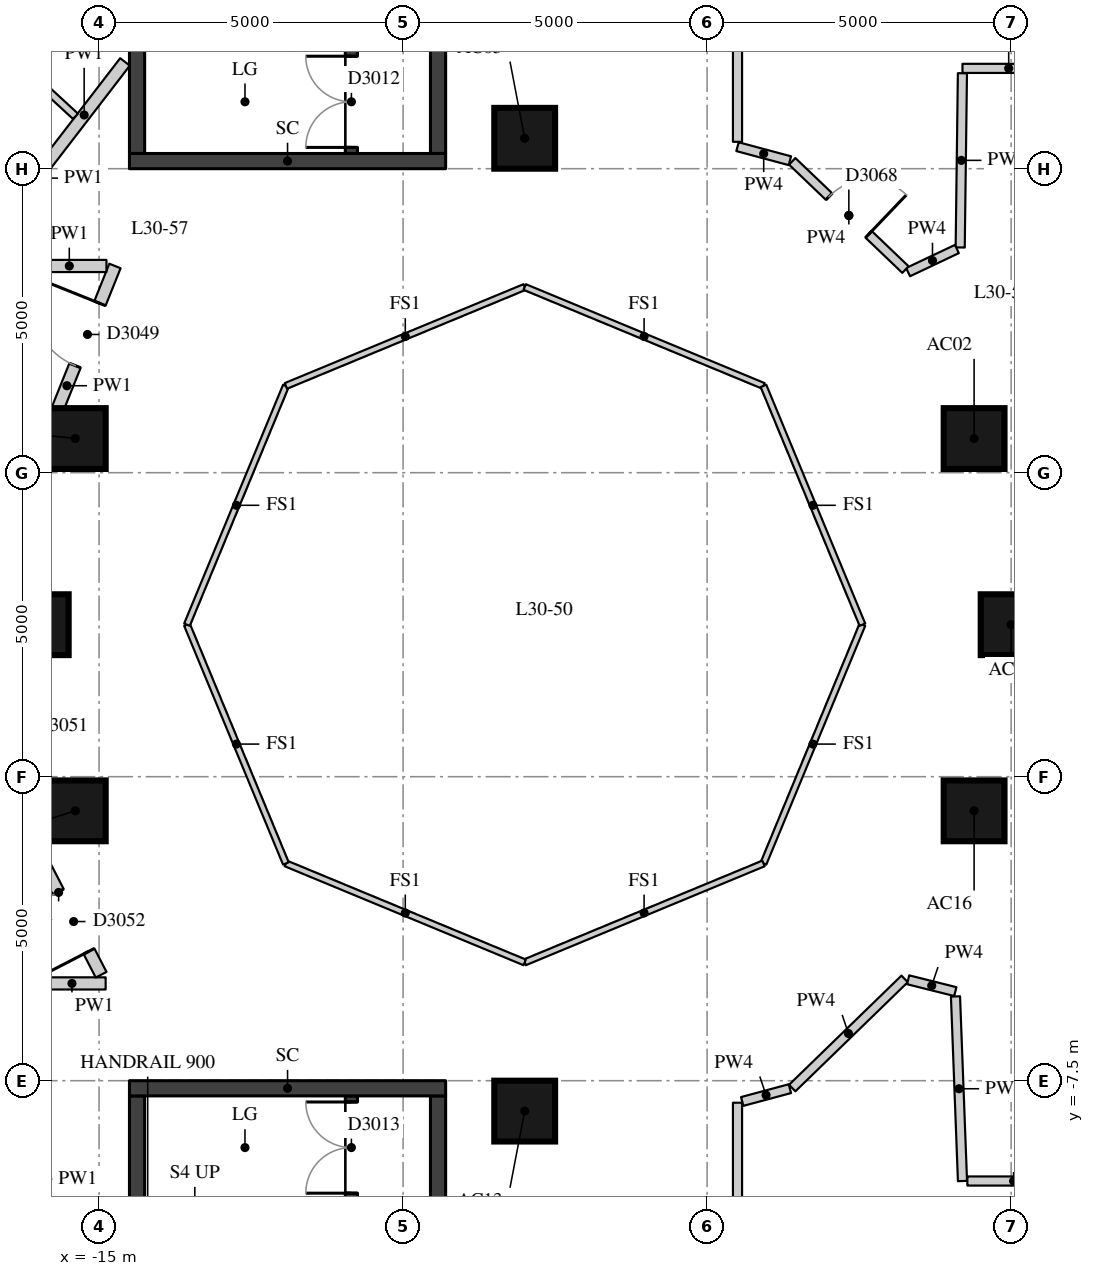
"""IFC4 building model, lengths in metres.
Left out: names, types, materials, properties, quantities, classifications, styles, units other than length and angle.
Written with IfcOpenShell. Run it as: python <this file> out.ifc"""

import sys

from ifc_helpers import new_model, si_unit, direction, frame, frame_2d, origin, origin_2d, place, context, subcontext, project, spatial, rectangle, extrude, element, fill, save


model = new_model("IFC4")
c1 = context("Model", 3, precision=1e-05, world=origin(), true_north=direction((0.0, 1.0)))
c2 = subcontext(c1, "Body", "Model", "MODEL_VIEW")
j1 = project(units=[si_unit("LENGTHUNIT", "METRE"), si_unit("PLANEANGLEUNIT", "RADIAN")], contexts=[c1])
p1 = place(None, origin())
s1 = spatial("IfcSite", under=j1, at=p1, CompositionType="ELEMENT")
p2 = place(p1, origin())
s2 = spatial("IfcBuilding", under=s1, at=p2, CompositionType="ELEMENT")
p3 = place(p2, frame((0.0, 0.0, 108.7)))
s3 = spatial("IfcBuildingStorey", under=s2, at=p3, CompositionType="ELEMENT", Elevation=108.7)
for number, where, z_axis, x_axis in (
    (1, (0.0, 0.0, 0.0), (0.0, 0.0, 1.0), (1.0, 0.0, 0.0)),
    (2, (-0.609, 3.062, 0.0), (0.0, 0.0, 1.0), (1.0, 0.0, 0.0)),
    (3, (-8.0, 8.0, 0.0), (0.0, 0.0, 1.0), (1.0, 0.0, 0.0)),
    (4, (-15.391, 3.062, 0.0), (0.0, 0.0, 1.0), (1.0, 0.0, 0.0)),
    (5, (-16.0, 0.0, 0.0), (0.0, 0.0, 1.0), (1.0, 0.0, 0.0)),
    (6, (-15.391, -3.062, 0.0), (0.0, 0.0, 1.0), (1.0, 0.0, 0.0)),
    (7, (-8.0, -8.0, 0.0), (0.0, 0.0, 1.0), (1.0, 0.0, 0.0)),
    (8, (-0.609, -3.062, 0.0), (0.0, 0.0, 1.0), (1.0, 0.0, 0.0)),
):
    element("IfcColumn", number, at=place(p3, frame(where, z_axis=z_axis, x_axis=x_axis)), inside=s3, PredefinedType="COLUMN", context=c2, shape_type="SweptSolid", body=[
        extrude(rectangle(XDim=1.0, YDim=1.0, at=origin_2d()), origin(), (0.0, 0.0, 1.0), 3.3),
    ])
p4 = place(p3, frame((-10.85, 7.75, 0.0), z_axis=(0.0, 0.0, 1.0), x_axis=(0.0, 1.0, 0.0)))
e9 = element("IfcWall", 9, at=p4, inside=s3, PredefinedType="SHEAR", context=c2, shape_type="SweptSolid", body=[
    extrude(rectangle(XDim=6.0, YDim=0.2, at=frame_2d((3.0, 0.0))), origin(), (0.0, 0.0, 1.0), 3.02),
])
p5 = place(p4, frame((0.1, 0.0, 0.0)))
e10 = element("IfcOpeningElement", 10, at=p5, cuts=e9, PredefinedType="OPENING", context=c2, shape_type="SweptSolid", body=[
    extrude(rectangle(XDim=1.5, YDim=2.1, at=frame_2d((0.75, 1.05))), frame((0.0, 0.11, 0.0), z_axis=(0.0, -1.0, 0.0), x_axis=(1.0, 0.0, 0.0)), (0.0, 0.0, 1.0), 0.22),
])
p6 = place(p3, frame((-10.85, -13.75, 0.0), z_axis=(0.0, 0.0, 1.0), x_axis=(0.0, 1.0, 0.0)))
e11 = element("IfcWall", 11, at=p6, inside=s3, PredefinedType="SHEAR", context=c2, shape_type="SweptSolid", body=[
    extrude(rectangle(XDim=6.0, YDim=0.2, at=frame_2d((3.0, 0.0))), origin(), (0.0, 0.0, 1.0), 3.02),
])
p7 = place(p6, frame((4.4, 0.0, 0.0)))
e12 = element("IfcOpeningElement", 12, at=p7, cuts=e11, PredefinedType="OPENING", context=c2, shape_type="SweptSolid", body=[
    extrude(rectangle(XDim=1.5, YDim=2.1, at=frame_2d((0.75, 1.05))), frame((0.0, 0.11, 0.0), z_axis=(0.0, -1.0, 0.0), x_axis=(1.0, 0.0, 0.0)), (0.0, 0.0, 1.0), 0.22),
])
p8 = place(p3, frame((-14.375, 7.75, -0.28), z_axis=(0.0, 0.0, 1.0), x_axis=(0.0, 1.0, 0.0)))
e13 = element("IfcWall", 13, at=p8, inside=s3, PredefinedType="SHEAR", context=c2, shape_type="SweptSolid", body=[
    extrude(rectangle(XDim=6.0, YDim=0.25, at=frame_2d((3.0, 0.0))), origin(), (0.0, 0.0, 1.0), 3.3),
])
p9 = place(p3, frame((-9.425, 7.75, -0.28), z_axis=(0.0, 0.0, 1.0), x_axis=(0.0, 1.0, 0.0)))
e14 = element("IfcWall", 14, at=p9, inside=s3, PredefinedType="SHEAR", context=c2, shape_type="SweptSolid", body=[
    extrude(rectangle(XDim=6.0, YDim=0.25, at=frame_2d((3.0, 0.0))), origin(), (0.0, 0.0, 1.0), 3.3),
])
p10 = place(p9, frame((2.1, 0.0, 0.28)))
e15 = element("IfcOpeningElement", 15, at=p10, cuts=e14, PredefinedType="OPENING", context=c2, shape_type="SweptSolid", body=[
    extrude(rectangle(XDim=1.5, YDim=2.1, at=frame_2d((0.75, 1.05))), frame((0.0, 0.135, 0.0), z_axis=(0.0, -1.0, 0.0), x_axis=(1.0, 0.0, 0.0)), (0.0, 0.0, 1.0), 0.27),
])
p11 = place(p3, frame((-14.5, 7.625, -0.28), z_axis=(0.0, 0.0, 1.0), x_axis=(1.0, 0.0, 0.0)))
e16 = element("IfcWall", 16, at=p11, inside=s3, PredefinedType="SHEAR", context=c2, shape_type="SweptSolid", body=[
    extrude(rectangle(XDim=5.2, YDim=0.25, at=frame_2d((2.6, 0.0))), origin(), (0.0, 0.0, 1.0), 3.3),
])
p12 = place(p3, frame((-14.375, -13.75, -0.28), z_axis=(0.0, 0.0, 1.0), x_axis=(0.0, 1.0, 0.0)))
e17 = element("IfcWall", 17, at=p12, inside=s3, PredefinedType="SHEAR", context=c2, shape_type="SweptSolid", body=[
    extrude(rectangle(XDim=6.0, YDim=0.25, at=frame_2d((3.0, 0.0))), origin(), (0.0, 0.0, 1.0), 3.3),
])
p13 = place(p3, frame((-9.425, -13.75, -0.28), z_axis=(0.0, 0.0, 1.0), x_axis=(0.0, 1.0, 0.0)))
e18 = element("IfcWall", 18, at=p13, inside=s3, PredefinedType="SHEAR", context=c2, shape_type="SweptSolid", body=[
    extrude(rectangle(XDim=6.0, YDim=0.25, at=frame_2d((3.0, 0.0))), origin(), (0.0, 0.0, 1.0), 3.3),
])
p14 = place(p13, frame((2.4, 0.0, 0.28)))
e19 = element("IfcOpeningElement", 19, at=p14, cuts=e18, PredefinedType="OPENING", context=c2, shape_type="SweptSolid", body=[
    extrude(rectangle(XDim=1.5, YDim=2.1, at=frame_2d((0.75, 1.05))), frame((0.0, 0.135, 0.0), z_axis=(0.0, -1.0, 0.0), x_axis=(1.0, 0.0, 0.0)), (0.0, 0.0, 1.0), 0.27),
])
p15 = place(p3, frame((-14.5, -7.625, -0.28), z_axis=(0.0, 0.0, 1.0), x_axis=(1.0, 0.0, 0.0)))
e20 = element("IfcWall", 20, at=p15, inside=s3, PredefinedType="SHEAR", context=c2, shape_type="SweptSolid", body=[
    extrude(rectangle(XDim=5.2, YDim=0.25, at=frame_2d((2.6, 0.0))), origin(), (0.0, 0.0, 1.0), 3.3),
])
p16 = place(p3, frame((-16.0, -5.9, 0.0), z_axis=(0.0, 0.0, 1.0), x_axis=(1.0, 0.0, 0.0)))
e21 = element("IfcWall", 21, at=p16, inside=s3, PredefinedType="PARTITIONING", context=c2, shape_type="SweptSolid", body=[
    extrude(rectangle(XDim=1.108, YDim=0.2, at=frame_2d((0.554, 0.0))), origin(), (0.0, 0.0, 1.0), 3.02),
])
p17 = place(p3, frame((-14.966, -5.757, 0.0), z_axis=(0.0, 0.0, 1.0), x_axis=(-0.458904116107, 0.888485797422, 0.0)))
e22 = element("IfcWall", 22, at=p17, inside=s3, PredefinedType="PARTITIONING", context=c2, shape_type="SweptSolid", body=[
    extrude(rectangle(XDim=3.047, YDim=0.2, at=frame_2d((1.524, 0.0))), origin(), (0.0, 0.0, 1.0), 3.02),
])
p18 = place(p17, frame((0.435, 0.0, 0.0)))
e23 = element("IfcOpeningElement", 23, at=p18, cuts=e22, PredefinedType="OPENING", context=c2, shape_type="SweptSolid", body=[
    extrude(rectangle(XDim=1.1, YDim=2.1, at=frame_2d((0.55, 1.05))), frame((0.0, 0.11, 0.0), z_axis=(0.0, -1.0, 0.0), x_axis=(1.0, 0.0, 0.0)), (0.0, 0.0, 1.0), 0.22),
])
p19 = place(p3, frame((-16.319, 1.961, 0.0), z_axis=(0.0, 0.0, 1.0), x_axis=(0.372352515432, 0.928091377102, 0.0)))
e24 = element("IfcWall", 24, at=p19, inside=s3, PredefinedType="PARTITIONING", context=c2, shape_type="SweptSolid", body=[
    extrude(rectangle(XDim=4.244, YDim=0.2, at=frame_2d((2.122, 0.0))), origin(), (0.0, 0.0, 1.0), 3.02),
])
p20 = place(p19, frame((2.481, 0.0, 0.0)))
e25 = element("IfcOpeningElement", 25, at=p20, cuts=e24, PredefinedType="OPENING", context=c2, shape_type="SweptSolid", body=[
    extrude(rectangle(XDim=1.1, YDim=2.1, at=frame_2d((0.55, 1.05))), frame((0.0, 0.11, 0.0), z_axis=(0.0, -1.0, 0.0), x_axis=(1.0, 0.0, 0.0)), (0.0, 0.0, 1.0), 0.22),
])
p21 = place(p3, frame((-14.879, 5.9, 0.0), z_axis=(0.0, 0.0, 1.0), x_axis=(-1.0, 0.0, 0.0)))
e26 = element("IfcWall", 26, at=p21, inside=s3, PredefinedType="PARTITIONING", context=c2, shape_type="SweptSolid", body=[
    extrude(rectangle(XDim=1.221, YDim=0.2, at=frame_2d((0.611, 0.0))), origin(), (0.0, 0.0, 1.0), 3.02),
])
p22 = place(p3, frame((-15.917, 7.51, 0.0), z_axis=(0.0, 0.0, 1.0), x_axis=(0.609673267649, 0.792652828617, 0.0)))
e27 = element("IfcWall", 27, at=p22, inside=s3, PredefinedType="PARTITIONING", context=c2, shape_type="SweptSolid", body=[
    extrude(rectangle(XDim=2.203, YDim=0.2, at=frame_2d((1.102, 0.0))), origin(), (0.0, 0.0, 1.0), 3.02),
])
p23 = place(p3, frame((0.72, 9.15, 0.0), z_axis=(0.0, 0.0, 1.0), x_axis=(-1.0, 0.0, 0.0)))
e28 = element("IfcWall", 28, at=p23, inside=s3, PredefinedType="PARTITIONING", context=c2, shape_type="SweptSolid", body=[
    extrude(rectangle(XDim=1.52, YDim=0.15, at=frame_2d((0.76, 0.0))), origin(), (0.0, 0.0, 1.0), 3.02),
])
p24 = place(p3, frame((-0.801, 9.07, 0.0), z_axis=(0.0, 0.0, 1.0), x_axis=(-0.012779053564, -0.999918344561, 0.0)))
e29 = element("IfcWall", 29, at=p24, inside=s3, PredefinedType="PARTITIONING", context=c2, shape_type="SweptSolid", body=[
    extrude(rectangle(XDim=2.866, YDim=0.15, at=frame_2d((1.433, 0.0))), origin(), (0.0, 0.0, 1.0), 3.02),
])
p25 = place(p3, frame((-0.892, 6.179, 0.0), z_axis=(0.0, 0.0, 1.0), x_axis=(-0.903944794982, -0.427649164181, 0.0)))
e30 = element("IfcWall", 30, at=p25, inside=s3, PredefinedType="PARTITIONING", context=c2, shape_type="SweptSolid", body=[
    extrude(rectangle(XDim=0.888, YDim=0.15, at=frame_2d((0.444, 0.0))), origin(), (0.0, 0.0, 1.0), 3.02),
])
p26 = place(p3, frame((-1.738, 5.841, 0.0), z_axis=(0.0, 0.0, 1.0), x_axis=(-0.722802374111, 0.691054793761, 0.0)))
e31 = element("IfcWall", 31, at=p26, inside=s3, PredefinedType="PARTITIONING", context=c2, shape_type="SweptSolid", body=[
    extrude(rectangle(XDim=2.576, YDim=0.15, at=frame_2d((1.288, 0.0))), origin(), (0.0, 0.0, 1.0), 3.02),
])
p27 = place(p26, frame((0.838, 0.0, 0.0)))
e32 = element("IfcOpeningElement", 32, at=p27, cuts=e31, PredefinedType="OPENING", context=c2, shape_type="SweptSolid", body=[
    extrude(rectangle(XDim=0.9, YDim=2.1, at=frame_2d((0.45, 1.05))), frame((0.0, 0.085, 0.0), z_axis=(0.0, -1.0, 0.0), x_axis=(1.0, 0.0, 0.0)), (0.0, 0.0, 1.0), 0.17),
])
p28 = place(p3, frame((-3.639, 7.631, 0.0), z_axis=(0.0, 0.0, 1.0), x_axis=(-0.965879594242, 0.258991523853, 0.0)))
e33 = element("IfcWall", 33, at=p28, inside=s3, PredefinedType="PARTITIONING", context=c2, shape_type="SweptSolid", body=[
    extrude(rectangle(XDim=0.892, YDim=0.15, at=frame_2d((0.446, 0.0))), origin(), (0.0, 0.0, 1.0), 3.02),
])
p29 = place(p3, frame((-4.5, 7.942, 0.0), z_axis=(0.0, 0.0, 1.0), x_axis=(0.0, 1.0, 0.0)))
e34 = element("IfcWall", 34, at=p29, inside=s3, PredefinedType="PARTITIONING", context=c2, shape_type="SweptSolid", body=[
    extrude(rectangle(XDim=3.292, YDim=0.15, at=frame_2d((1.646, 0.0))), origin(), (0.0, 0.0, 1.0), 3.02),
])
p30 = place(p3, frame((-3.6, -7.621, 0.0), z_axis=(0.0, 0.0, 1.0), x_axis=(0.717359204099, 0.696703503862, 0.0)))
e35 = element("IfcWall", 35, at=p30, inside=s3, PredefinedType="PARTITIONING", context=c2, shape_type="SweptSolid", body=[
    extrude(rectangle(XDim=2.577, YDim=0.15, at=frame_2d((1.288, 0.0))), origin(), (0.0, 0.0, 1.0), 3.02),
])
p31 = place(p3, frame((-1.694, -5.84, 0.0), z_axis=(0.0, 0.0, 1.0), x_axis=(0.970106576928, -0.242679272705, 0.0)))
e36 = element("IfcWall", 36, at=p31, inside=s3, PredefinedType="PARTITIONING", context=c2, shape_type="SweptSolid", body=[
    extrude(rectangle(XDim=0.8, YDim=0.15, at=frame_2d((0.4, 0.0))), origin(), (0.0, 0.0, 1.0), 3.02),
])
p32 = place(p3, frame((-0.915, -6.115, 0.0), z_axis=(0.0, 0.0, 1.0), x_axis=(0.037855898917, -0.999283208564, 0.0)))
e37 = element("IfcWall", 37, at=p32, inside=s3, PredefinedType="PARTITIONING", context=c2, shape_type="SweptSolid", body=[
    extrude(rectangle(XDim=3.038, YDim=0.15, at=frame_2d((1.519, 0.0))), origin(), (0.0, 0.0, 1.0), 3.02),
])
p33 = place(p3, frame((-0.72, -9.15, 0.0), z_axis=(0.0, 0.0, 1.0), x_axis=(1.0, 0.0, 0.0)))
e38 = element("IfcWall", 38, at=p33, inside=s3, PredefinedType="PARTITIONING", context=c2, shape_type="SweptSolid", body=[
    extrude(rectangle(XDim=1.52, YDim=0.15, at=frame_2d((0.76, 0.0))), origin(), (0.0, 0.0, 1.0), 3.02),
])
p34 = place(p3, frame((-4.5, -12.588, 0.0), z_axis=(0.0, 0.0, 1.0), x_axis=(0.0, 1.0, 0.0)))
e39 = element("IfcWall", 39, at=p34, inside=s3, PredefinedType="PARTITIONING", context=c2, shape_type="SweptSolid", body=[
    extrude(rectangle(XDim=4.726, YDim=0.15, at=frame_2d((2.363, 0.0))), origin(), (0.0, 0.0, 1.0), 3.02),
])
p35 = place(p3, frame((-4.423, -7.842, 0.0), z_axis=(0.0, 0.0, 1.0), x_axis=(0.96582447955, 0.259196980502, 0.0)))
e40 = element("IfcWall", 40, at=p35, inside=s3, PredefinedType="PARTITIONING", context=c2, shape_type="SweptSolid", body=[
    extrude(rectangle(XDim=0.812, YDim=0.15, at=frame_2d((0.406, 0.0))), origin(), (0.0, 0.0, 1.0), 3.02),
])
p36 = place(p3, frame((-15.387, 8.362, 0.0), z_axis=(0.0, 0.0, 1.0), x_axis=(-0.735313004993, 0.677727662626, 0.0)))
e41 = element("IfcWall", 41, at=p36, inside=s3, PredefinedType="PARTITIONING", context=c2, shape_type="SweptSolid", body=[
    extrude(rectangle(XDim=2.497, YDim=0.12, at=frame_2d((1.249, 0.0))), origin(), (0.0, 0.0, 1.0), 3.02),
])
for number, where, z_axis, x_axis in (
    (42, (-2.446, 0.0, 0.0), (0.0, 0.0, 1.0), (-0.383, -0.924, 0.0)),
    (43, (-4.073, -3.927, 0.0), (0.0, 0.0, 1.0), (-0.924, -0.383, 0.0)),
    (44, (-8.0, -5.554, 0.0), (0.0, 0.0, 1.0), (-0.924, 0.383, 0.0)),
    (45, (-11.927, -3.927, 0.0), (0.0, 0.0, 1.0), (-0.383, 0.924, 0.0)),
    (46, (-13.554, 0.0, 0.0), (0.0, 0.0, 1.0), (0.383, 0.924, 0.0)),
    (47, (-11.927, 3.927, 0.0), (0.0, 0.0, 1.0), (0.924, 0.383, 0.0)),
    (48, (-8.0, 5.554, 0.0), (0.0, 0.0, 1.0), (0.924, -0.383, 0.0)),
    (49, (-4.073, 3.927, 0.0), (0.0, 0.0, 1.0), (0.383, -0.924, 0.0)),
):
    element("IfcWall", number, at=place(p3, frame(where, z_axis=z_axis, x_axis=x_axis)), inside=s3, PredefinedType="PARTITIONING", context=c2, shape_type="SweptSolid", body=[
        extrude(rectangle(XDim=4.251, YDim=0.1, at=frame_2d((2.125, 0.0))), origin(), (0.0, 0.0, 1.0), 3.02),
    ])
p37 = place(p5, origin())
e50 = element("IfcDoor", 50, at=p37, inside=s3, OperationType="DOUBLE_DOOR_SINGLE_SWING", PredefinedType="DOOR", context=c2, shape_type="SweptSolid", body=[
    extrude(rectangle(XDim=1.5, YDim=2.1, at=frame_2d((0.75, 1.05))), frame((0.0, 0.025, 0.0), z_axis=(0.0, -1.0, 0.0), x_axis=(1.0, 0.0, 0.0)), (0.0, 0.0, 1.0), 0.05),
])
fill(e10, e50)
p38 = place(p7, origin())
e51 = element("IfcDoor", 51, at=p38, inside=s3, OperationType="DOUBLE_DOOR_SINGLE_SWING", PredefinedType="DOOR", context=c2, shape_type="SweptSolid", body=[
    extrude(rectangle(XDim=1.5, YDim=2.1, at=frame_2d((0.75, 1.05))), frame((0.0, 0.025, 0.0), z_axis=(0.0, -1.0, 0.0), x_axis=(1.0, 0.0, 0.0)), (0.0, 0.0, 1.0), 0.05),
])
fill(e12, e51)
p39 = place(p20, origin())
e52 = element("IfcDoor", 52, at=p39, inside=s3, OperationType="SINGLE_SWING_RIGHT", PredefinedType="DOOR", context=c2, shape_type="SweptSolid", body=[
    extrude(rectangle(XDim=1.1, YDim=2.1, at=frame_2d((0.55, 1.05))), frame((0.0, 0.025, 0.0), z_axis=(0.0, -1.0, 0.0), x_axis=(1.0, 0.0, 0.0)), (0.0, 0.0, 1.0), 0.05),
])
fill(e25, e52)
p40 = place(p18, origin())
e53 = element("IfcDoor", 53, at=p40, inside=s3, OperationType="SINGLE_SWING_LEFT", PredefinedType="DOOR", context=c2, shape_type="SweptSolid", body=[
    extrude(rectangle(XDim=1.1, YDim=2.1, at=frame_2d((0.55, 1.05))), frame((0.0, 0.025, 0.0), z_axis=(0.0, -1.0, 0.0), x_axis=(1.0, 0.0, 0.0)), (0.0, 0.0, 1.0), 0.05),
])
fill(e23, e53)
p41 = place(p27, origin())
e54 = element("IfcDoor", 54, at=p41, inside=s3, OperationType="SINGLE_SWING_RIGHT", PredefinedType="DOOR", context=c2, shape_type="SweptSolid", body=[
    extrude(rectangle(XDim=0.9, YDim=2.1, at=frame_2d((0.45, 1.05))), frame((0.0, 0.025, 0.0), z_axis=(0.0, -1.0, 0.0), x_axis=(1.0, 0.0, 0.0)), (0.0, 0.0, 1.0), 0.05),
])
fill(e32, e54)
save(model, sys.argv[1])
